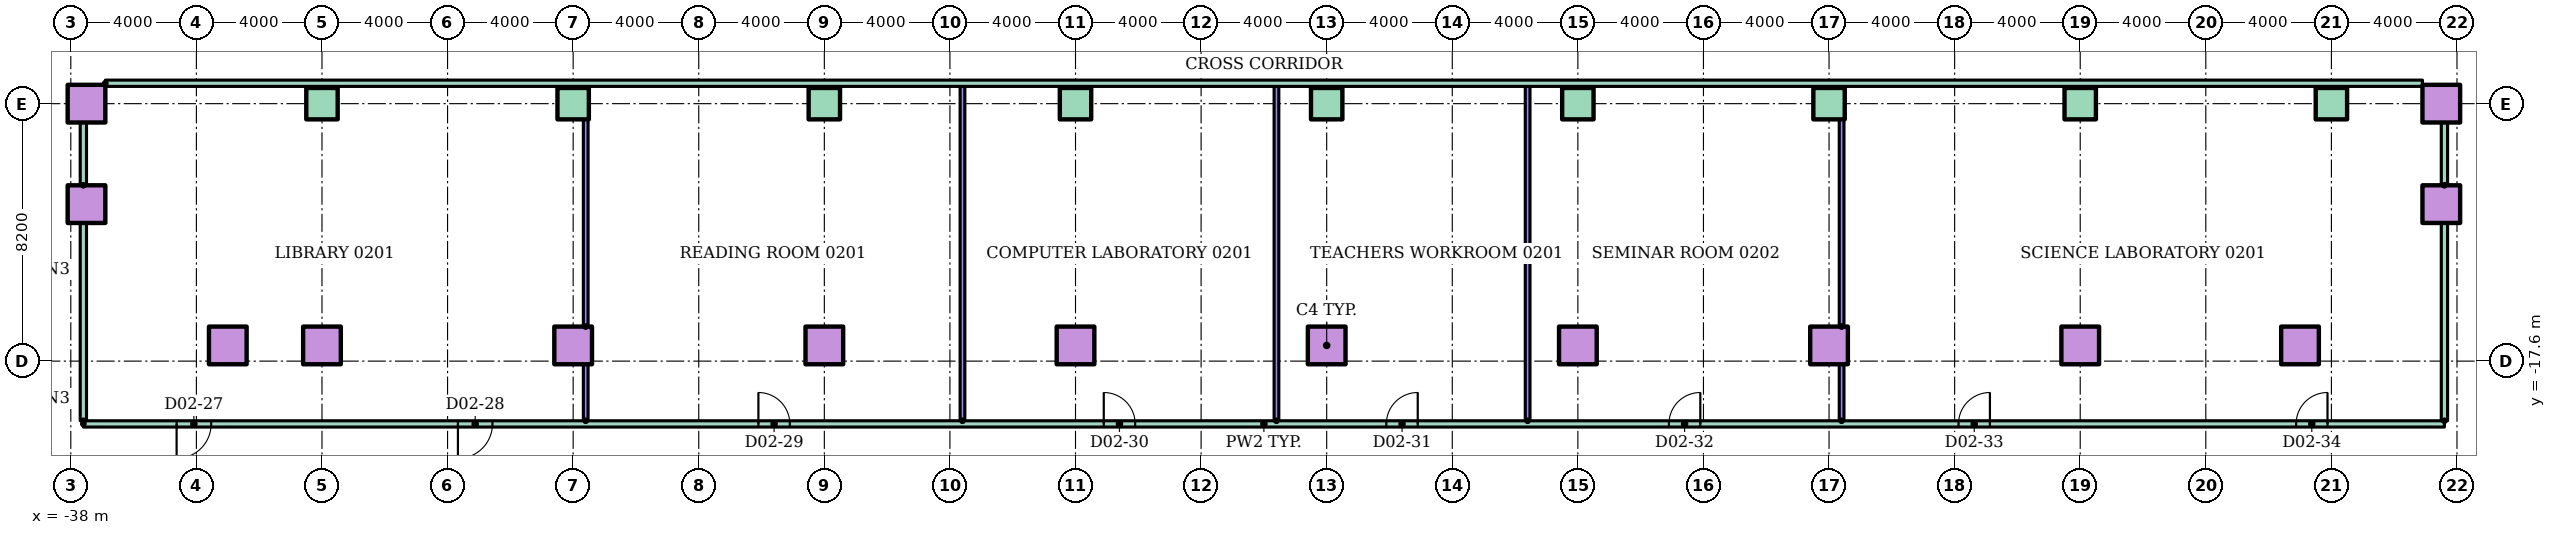
"""IFC4 building model, lengths in metres.
Left out: names, types, materials, properties, quantities, classifications, styles, units other than length and angle.
Written with IfcOpenShell. Run it as: python <this file> out.ifc"""

import sys

from ifc_helpers import new_model, si_unit, direction, frame, frame_2d, origin, origin_2d, place, context, subcontext, project, spatial, rectangle, hollow_rectangle, extrude, element, fill, save


model = new_model("IFC4")
c1 = context("Model", 3, precision=1e-05, world=origin(), true_north=direction((0.0, 1.0)))
c2 = subcontext(c1, "Body", "Model", "MODEL_VIEW")
j1 = project(units=[si_unit("LENGTHUNIT", "METRE"), si_unit("PLANEANGLEUNIT", "RADIAN")], contexts=[c1])
p1 = place(None, origin())
s1 = spatial("IfcSite", under=j1, at=p1, CompositionType="ELEMENT")
p2 = place(p1, origin())
s2 = spatial("IfcBuilding", under=s1, at=p2, CompositionType="ELEMENT")
p3 = place(p2, frame((0.0, 0.0, 10.0)))
s3 = spatial("IfcBuildingStorey", under=s2, at=p3, CompositionType="ELEMENT", Elevation=10.0)
for number, where in (
    (1, (-33.0, -17.1, 0.0)),
    (2, (-30.0, -17.1, 0.0)),
    (3, (-22.0, -17.1, 0.0)),
    (4, (-14.0, -17.1, 0.0)),
    (5, (-6.0, -17.1, 0.0)),
    (6, (2.0, -17.1, 0.0)),
    (7, (10.0, -17.1, 0.0)),
    (8, (18.0, -17.1, 0.0)),
    (9, (26.0, -17.1, 0.0)),
    (10, (33.0, -17.1, 0.0)),
    (11, (-37.5, -12.6, 0.0)),
    (12, (37.5, -12.6, 0.0)),
    (13, (-37.5, -9.4, 0.0)),
):
    element("IfcColumn", number, at=place(p3, frame(where)), inside=s3, PredefinedType="COLUMN", context=c2, shape_type="SweptSolid", body=[
        extrude(hollow_rectangle(XDim=1.2, YDim=1.2, WallThickness=0.06, at=origin_2d()), origin(), (0.0, 0.0, 1.0), 4.0),
    ])
for number, where in (
    (14, (-30.0, -9.4, 0.0)),
    (15, (-22.0, -9.4, 0.0)),
    (16, (-14.0, -9.4, 0.0)),
    (17, (-6.0, -9.4, 0.0)),
    (18, (2.0, -9.4, 0.0)),
    (19, (10.0, -9.4, 0.0)),
    (20, (18.0, -9.4, 0.0)),
    (21, (26.0, -9.4, 0.0)),
    (22, (34.0, -9.4, 0.0)),
):
    element("IfcColumn", number, at=place(p3, frame(where)), inside=s3, PredefinedType="COLUMN", context=c2, shape_type="SweptSolid", body=[
        extrude(rectangle(XDim=1.0, YDim=1.0, at=origin_2d()), origin(), (0.0, 0.0, 1.0), 4.0),
    ])
p4 = place(p3, frame((37.5, -9.4, 0.0)))
e23 = element("IfcColumn", 23, at=p4, inside=s3, PredefinedType="COLUMN", context=c2, shape_type="SweptSolid", body=[
    extrude(hollow_rectangle(XDim=1.2, YDim=1.2, WallThickness=0.06, at=origin_2d()), origin(), (0.0, 0.0, 1.0), 4.0),
])
p5 = place(p3, frame((-37.6, -19.6, 0.0)))
e24 = element("IfcWall", 24, at=p5, inside=s3, PredefinedType="PARTITIONING", context=c2, shape_type="SweptSolid", body=[
    extrude(rectangle(XDim=75.2, YDim=0.2, at=frame_2d((37.6, 0.0))), origin(), (0.0, 0.0, 1.0), 3.7),
])
p6 = place(p5, frame((2.97, 0.0, 0.0)))
e25 = element("IfcOpeningElement", 25, at=p6, cuts=e24, PredefinedType="OPENING", context=c2, shape_type="SweptSolid", body=[
    extrude(rectangle(XDim=1.1, YDim=2.1, at=frame_2d((0.55, 1.05))), frame((0.0, 0.11, 0.0), z_axis=(0.0, -1.0, 0.0), x_axis=(1.0, 0.0, 0.0)), (0.0, 0.0, 1.0), 0.22),
])
p7 = place(p5, frame((11.93, 0.0, 0.0)))
e26 = element("IfcOpeningElement", 26, at=p7, cuts=e24, PredefinedType="OPENING", context=c2, shape_type="SweptSolid", body=[
    extrude(rectangle(XDim=1.1, YDim=2.1, at=frame_2d((0.55, 1.05))), frame((0.0, 0.11, 0.0), z_axis=(0.0, -1.0, 0.0), x_axis=(1.0, 0.0, 0.0)), (0.0, 0.0, 1.0), 0.22),
])
p8 = place(p5, frame((21.5, 0.0, 0.0)))
e27 = element("IfcOpeningElement", 27, at=p8, cuts=e24, PredefinedType="OPENING", context=c2, shape_type="SweptSolid", body=[
    extrude(rectangle(XDim=1.0, YDim=2.1, at=frame_2d((0.5, 1.05))), frame((0.0, 0.11, 0.0), z_axis=(0.0, -1.0, 0.0), x_axis=(1.0, 0.0, 0.0)), (0.0, 0.0, 1.0), 0.22),
])
p9 = place(p5, frame((32.5, 0.0, 0.0)))
e28 = element("IfcOpeningElement", 28, at=p9, cuts=e24, PredefinedType="OPENING", context=c2, shape_type="SweptSolid", body=[
    extrude(rectangle(XDim=1.0, YDim=2.1, at=frame_2d((0.5, 1.05))), frame((0.0, 0.11, 0.0), z_axis=(0.0, -1.0, 0.0), x_axis=(1.0, 0.0, 0.0)), (0.0, 0.0, 1.0), 0.22),
])
p10 = place(p5, frame((41.5, 0.0, 0.0)))
e29 = element("IfcOpeningElement", 29, at=p10, cuts=e24, PredefinedType="OPENING", context=c2, shape_type="SweptSolid", body=[
    extrude(rectangle(XDim=1.0, YDim=2.1, at=frame_2d((0.5, 1.05))), frame((0.0, 0.11, 0.0), z_axis=(0.0, -1.0, 0.0), x_axis=(1.0, 0.0, 0.0)), (0.0, 0.0, 1.0), 0.22),
])
p11 = place(p5, frame((50.5, 0.0, 0.0)))
e30 = element("IfcOpeningElement", 30, at=p11, cuts=e24, PredefinedType="OPENING", context=c2, shape_type="SweptSolid", body=[
    extrude(rectangle(XDim=1.0, YDim=2.1, at=frame_2d((0.5, 1.05))), frame((0.0, 0.11, 0.0), z_axis=(0.0, -1.0, 0.0), x_axis=(1.0, 0.0, 0.0)), (0.0, 0.0, 1.0), 0.22),
])
p12 = place(p5, frame((59.724, 0.0, 0.0)))
e31 = element("IfcOpeningElement", 31, at=p12, cuts=e24, PredefinedType="OPENING", context=c2, shape_type="SweptSolid", body=[
    extrude(rectangle(XDim=1.0, YDim=2.1, at=frame_2d((0.5, 1.05))), frame((0.0, 0.11, 0.0), z_axis=(0.0, -1.0, 0.0), x_axis=(1.0, 0.0, 0.0)), (0.0, 0.0, 1.0), 0.22),
])
p13 = place(p5, frame((70.476, 0.0, 0.0)))
e32 = element("IfcOpeningElement", 32, at=p13, cuts=e24, PredefinedType="OPENING", context=c2, shape_type="SweptSolid", body=[
    extrude(rectangle(XDim=1.0, YDim=2.1, at=frame_2d((0.5, 1.05))), frame((0.0, 0.11, 0.0), z_axis=(0.0, -1.0, 0.0), x_axis=(1.0, 0.0, 0.0)), (0.0, 0.0, 1.0), 0.22),
])
p14 = place(p3, frame((-36.9, -8.75, 0.0)))
e33 = element("IfcWall", 33, at=p14, inside=s3, PredefinedType="PARTITIONING", context=c2, shape_type="SweptSolid", body=[
    extrude(rectangle(XDim=73.8, YDim=0.2, at=frame_2d((36.9, 0.0))), origin(), (0.0, 0.0, 1.0), 3.7),
])
p15 = place(p3, frame((-37.6, -19.5, 0.0), z_axis=(0.0, 0.0, 1.0), x_axis=(0.0, 1.0, 0.0)))
e34 = element("IfcWall", 34, at=p15, inside=s3, PredefinedType="PARTITIONING", context=c2, shape_type="SweptSolid", body=[
    extrude(rectangle(XDim=6.3, YDim=0.2, at=frame_2d((3.15, 0.0))), origin(), (0.0, 0.0, 1.0), 3.7),
])
p16 = place(p3, frame((-37.6, -12.0, 0.0), z_axis=(0.0, 0.0, 1.0), x_axis=(0.0, 1.0, 0.0)))
e35 = element("IfcWall", 35, at=p16, inside=s3, PredefinedType="PARTITIONING", context=c2, shape_type="SweptSolid", body=[
    extrude(rectangle(XDim=2.0, YDim=0.2, at=frame_2d((1.0, 0.0))), origin(), (0.0, 0.0, 1.0), 3.7),
])
p17 = place(p3, frame((-21.6, -19.5, 0.0), z_axis=(0.0, 0.0, 1.0), x_axis=(0.0, 1.0, 0.0)))
e36 = element("IfcWall", 36, at=p17, inside=s3, PredefinedType="PARTITIONING", context=c2, shape_type="SweptSolid", body=[
    extrude(rectangle(XDim=1.8, YDim=0.15, at=frame_2d((0.9, 0.0))), origin(), (0.0, 0.0, 1.0), 3.7),
])
p18 = place(p3, frame((-21.6, -16.5, 0.0), z_axis=(0.0, 0.0, 1.0), x_axis=(0.0, 1.0, 0.0)))
e37 = element("IfcWall", 37, at=p18, inside=s3, PredefinedType="PARTITIONING", context=c2, shape_type="SweptSolid", body=[
    extrude(rectangle(XDim=6.6, YDim=0.15, at=frame_2d((3.3, 0.0))), origin(), (0.0, 0.0, 1.0), 3.7),
])
for number, where, z_axis, x_axis in (
    (38, (-9.6, -19.5, 0.0), (0.0, 0.0, 1.0), (0.0, 1.0, 0.0)),
    (39, (0.4, -19.5, 0.0), (0.0, 0.0, 1.0), (0.0, 1.0, 0.0)),
    (40, (8.4, -19.5, 0.0), (0.0, 0.0, 1.0), (0.0, 1.0, 0.0)),
):
    element("IfcWall", number, at=place(p3, frame(where, z_axis=z_axis, x_axis=x_axis)), inside=s3, PredefinedType="PARTITIONING", context=c2, shape_type="SweptSolid", body=[
        extrude(rectangle(XDim=10.65, YDim=0.15, at=frame_2d((5.325, 0.0))), origin(), (0.0, 0.0, 1.0), 3.7),
    ])
p19 = place(p3, frame((18.4, -19.5, 0.0), z_axis=(0.0, 0.0, 1.0), x_axis=(0.0, 1.0, 0.0)))
e41 = element("IfcWall", 41, at=p19, inside=s3, PredefinedType="PARTITIONING", context=c2, shape_type="SweptSolid", body=[
    extrude(rectangle(XDim=1.8, YDim=0.15, at=frame_2d((0.9, 0.0))), origin(), (0.0, 0.0, 1.0), 3.7),
])
p20 = place(p3, frame((18.4, -16.5, 0.0), z_axis=(0.0, 0.0, 1.0), x_axis=(0.0, 1.0, 0.0)))
e42 = element("IfcWall", 42, at=p20, inside=s3, PredefinedType="PARTITIONING", context=c2, shape_type="SweptSolid", body=[
    extrude(rectangle(XDim=6.6, YDim=0.15, at=frame_2d((3.3, 0.0))), origin(), (0.0, 0.0, 1.0), 3.7),
])
p21 = place(p3, frame((37.6, -19.5, 0.0), z_axis=(0.0, 0.0, 1.0), x_axis=(0.0, 1.0, 0.0)))
e43 = element("IfcWall", 43, at=p21, inside=s3, PredefinedType="PARTITIONING", context=c2, shape_type="SweptSolid", body=[
    extrude(rectangle(XDim=6.3, YDim=0.2, at=frame_2d((3.15, 0.0))), origin(), (0.0, 0.0, 1.0), 3.7),
])
p22 = place(p3, frame((37.6, -12.0, 0.0), z_axis=(0.0, 0.0, 1.0), x_axis=(0.0, 1.0, 0.0)))
e44 = element("IfcWall", 44, at=p22, inside=s3, PredefinedType="PARTITIONING", context=c2, shape_type="SweptSolid", body=[
    extrude(rectangle(XDim=2.0, YDim=0.2, at=frame_2d((1.0, 0.0))), origin(), (0.0, 0.0, 1.0), 3.7),
])
p23 = place(p6, frame((1.1, 0.0, 0.0), z_axis=(0.0, 0.0, 1.0), x_axis=(-1.0, 0.0, 0.0)))
e45 = element("IfcDoor", 45, at=p23, inside=s3, OperationType="SINGLE_SWING_LEFT", PredefinedType="DOOR", context=c2, shape_type="SweptSolid", body=[
    extrude(rectangle(XDim=1.1, YDim=2.1, at=frame_2d((0.55, 1.05))), frame((0.0, 0.025, 0.0), z_axis=(0.0, -1.0, 0.0), x_axis=(1.0, 0.0, 0.0)), (0.0, 0.0, 1.0), 0.05),
])
fill(e25, e45)
p24 = place(p7, frame((1.1, 0.0, 0.0), z_axis=(0.0, 0.0, 1.0), x_axis=(-1.0, 0.0, 0.0)))
e46 = element("IfcDoor", 46, at=p24, inside=s3, OperationType="SINGLE_SWING_LEFT", PredefinedType="DOOR", context=c2, shape_type="SweptSolid", body=[
    extrude(rectangle(XDim=1.1, YDim=2.1, at=frame_2d((0.55, 1.05))), frame((0.0, 0.025, 0.0), z_axis=(0.0, -1.0, 0.0), x_axis=(1.0, 0.0, 0.0)), (0.0, 0.0, 1.0), 0.05),
])
fill(e26, e46)
p25 = place(p8, origin())
e47 = element("IfcDoor", 47, at=p25, inside=s3, OperationType="SINGLE_SWING_LEFT", PredefinedType="DOOR", context=c2, shape_type="SweptSolid", body=[
    extrude(rectangle(XDim=1.0, YDim=2.1, at=frame_2d((0.5, 1.05))), frame((0.0, 0.025, 0.0), z_axis=(0.0, -1.0, 0.0), x_axis=(1.0, 0.0, 0.0)), (0.0, 0.0, 1.0), 0.05),
])
fill(e27, e47)
p26 = place(p9, origin())
e48 = element("IfcDoor", 48, at=p26, inside=s3, OperationType="SINGLE_SWING_LEFT", PredefinedType="DOOR", context=c2, shape_type="SweptSolid", body=[
    extrude(rectangle(XDim=1.0, YDim=2.1, at=frame_2d((0.5, 1.05))), frame((0.0, 0.025, 0.0), z_axis=(0.0, -1.0, 0.0), x_axis=(1.0, 0.0, 0.0)), (0.0, 0.0, 1.0), 0.05),
])
fill(e28, e48)
p27 = place(p10, origin())
e49 = element("IfcDoor", 49, at=p27, inside=s3, OperationType="SINGLE_SWING_RIGHT", PredefinedType="DOOR", context=c2, shape_type="SweptSolid", body=[
    extrude(rectangle(XDim=1.0, YDim=2.1, at=frame_2d((0.5, 1.05))), frame((0.0, 0.025, 0.0), z_axis=(0.0, -1.0, 0.0), x_axis=(1.0, 0.0, 0.0)), (0.0, 0.0, 1.0), 0.05),
])
fill(e29, e49)
p28 = place(p11, origin())
e50 = element("IfcDoor", 50, at=p28, inside=s3, OperationType="SINGLE_SWING_RIGHT", PredefinedType="DOOR", context=c2, shape_type="SweptSolid", body=[
    extrude(rectangle(XDim=1.0, YDim=2.1, at=frame_2d((0.5, 1.05))), frame((0.0, 0.025, 0.0), z_axis=(0.0, -1.0, 0.0), x_axis=(1.0, 0.0, 0.0)), (0.0, 0.0, 1.0), 0.05),
])
fill(e30, e50)
p29 = place(p12, origin())
e51 = element("IfcDoor", 51, at=p29, inside=s3, OperationType="SINGLE_SWING_RIGHT", PredefinedType="DOOR", context=c2, shape_type="SweptSolid", body=[
    extrude(rectangle(XDim=1.0, YDim=2.1, at=frame_2d((0.5, 1.05))), frame((0.0, 0.025, 0.0), z_axis=(0.0, -1.0, 0.0), x_axis=(1.0, 0.0, 0.0)), (0.0, 0.0, 1.0), 0.05),
])
fill(e31, e51)
p30 = place(p13, origin())
e52 = element("IfcDoor", 52, at=p30, inside=s3, OperationType="SINGLE_SWING_RIGHT", PredefinedType="DOOR", context=c2, shape_type="SweptSolid", body=[
    extrude(rectangle(XDim=1.0, YDim=2.1, at=frame_2d((0.5, 1.05))), frame((0.0, 0.025, 0.0), z_axis=(0.0, -1.0, 0.0), x_axis=(1.0, 0.0, 0.0)), (0.0, 0.0, 1.0), 0.05),
])
fill(e32, e52)
save(model, sys.argv[1])
